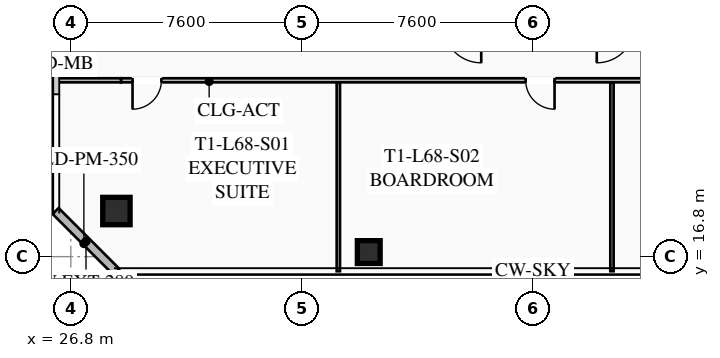
"""IFC4 building model, lengths in metres.
Left out: names, types, materials, properties, quantities, classifications, styles, units other than length and angle.
Written with IfcOpenShell. Run it as: python <this file> out.ifc"""

import sys

from ifc_helpers import new_model, si_unit, direction, frame, frame_2d, origin, origin_2d, place, context, subcontext, project, spatial, rectangle, hollow_rectangle, extrude, element, fill, save


model = new_model("IFC4")
c1 = context("Model", 3, precision=1e-05, world=origin(), true_north=direction((0.0, 1.0)))
c2 = subcontext(c1, "Body", "Model", "MODEL_VIEW")
j1 = project(units=[si_unit("LENGTHUNIT", "METRE"), si_unit("PLANEANGLEUNIT", "RADIAN")], contexts=[c1])
p1 = place(None, origin())
s1 = spatial("IfcSite", under=j1, at=p1, CompositionType="ELEMENT")
p2 = place(p1, origin())
s2 = spatial("IfcBuilding", under=s1, at=p2, CompositionType="ELEMENT")
p3 = place(p2, frame((0.0, 0.0, 251.4)))
s3 = spatial("IfcBuildingStorey", under=s2, at=p3, CompositionType="ELEMENT", Elevation=251.4)
p4 = place(p3, frame((28.3, 18.3, 0.0), z_axis=(0.0, 0.0, 1.0), x_axis=(1.0, 0.0, 0.0)))
e1 = element("IfcColumn", 1, at=p4, inside=s3, PredefinedType="COLUMN", context=c2, shape_type="SweptSolid", body=[
    extrude(hollow_rectangle(XDim=0.9, YDim=0.9, WallThickness=0.04, at=origin_2d()), origin(), (0.0, 0.0, 1.0), 3.78),
])
p5 = place(p3, frame((36.6, 16.95, 0.0), z_axis=(0.0, 0.0, 1.0), x_axis=(1.0, 0.0, 0.0)))
e2 = element("IfcColumn", 2, at=p5, inside=s3, PredefinedType="COLUMN", context=c2, shape_type="SweptSolid", body=[
    extrude(hollow_rectangle(XDim=0.75, YDim=0.75, WallThickness=0.032, at=origin_2d()), origin(), (0.0, 0.0, 1.0), 3.78),
])
p6 = place(p3, frame((28.3, 16.3, 0.0), z_axis=(0.0, 0.0, 1.0), x_axis=(-0.707106781187, 0.707106781187, 0.0)))
e3 = element("IfcWall", 3, at=p6, inside=s3, PredefinedType="SOLIDWALL", context=c2, shape_type="SweptSolid", body=[
    extrude(rectangle(XDim=2.828, YDim=0.28, at=frame_2d((1.414, 0.0))), origin(), (0.0, 0.0, 1.0), 3.78),
])
p7 = place(p3, frame((52.95, 22.6, 0.0), z_axis=(0.0, 0.0, 1.0), x_axis=(-1.0, 0.0, 0.0)))
e4 = element("IfcWall", 4, at=p7, inside=s3, PredefinedType="PARTITIONING", context=c2, shape_type="SweptSolid", body=[
    extrude(rectangle(XDim=24.5, YDim=0.135, at=frame_2d((12.25, 0.0))), origin(), (0.0, 0.0, 1.0), 2.971),
])
p8 = place(p7, frame((23.17, 0.0, 0.0)))
e5 = element("IfcOpeningElement", 5, at=p8, cuts=e4, PredefinedType="OPENING", context=c2, shape_type="SweptSolid", body=[
    extrude(rectangle(XDim=0.95, YDim=2.05, at=frame_2d((0.475, 1.025))), frame((0.0, 0.077, 0.0), z_axis=(0.0, -1.0, 0.0), x_axis=(1.0, 0.0, 0.0)), (0.0, 0.0, 1.0), 0.155),
])
p9 = place(p7, frame((10.238, 0.0, 0.0)))
e6 = element("IfcOpeningElement", 6, at=p9, cuts=e4, PredefinedType="OPENING", context=c2, shape_type="SweptSolid", body=[
    extrude(rectangle(XDim=0.95, YDim=2.05, at=frame_2d((0.475, 1.025))), frame((0.0, 0.077, 0.0), z_axis=(0.0, -1.0, 0.0), x_axis=(1.0, 0.0, 0.0)), (0.0, 0.0, 1.0), 0.155),
])
p10 = place(p7, frame((0.38, 0.0, 0.0)))
e7 = element("IfcOpeningElement", 7, at=p10, cuts=e4, PredefinedType="OPENING", context=c2, shape_type="SweptSolid", body=[
    extrude(rectangle(XDim=0.95, YDim=2.05, at=frame_2d((0.475, 1.025))), frame((0.0, 0.077, 0.0), z_axis=(0.0, -1.0, 0.0), x_axis=(1.0, 0.0, 0.0)), (0.0, 0.0, 1.0), 0.155),
])
p11 = place(p3, frame((26.32, 22.6, 0.0), z_axis=(0.0, 0.0, 1.0), x_axis=(1.0, 0.0, 0.0)))
e8 = element("IfcWall", 8, at=p11, inside=s3, PredefinedType="PARTITIONING", context=c2, shape_type="SweptSolid", body=[
    extrude(rectangle(XDim=2.13, YDim=0.135, at=frame_2d((1.065, 0.0))), origin(), (0.0, 0.0, 1.0), 2.971),
])
for number, where, z_axis, x_axis in (
    (9, (35.6, 16.32, 0.0), (0.0, 0.0, 1.0), (0.0, 1.0, 0.0)),
    (10, (44.6, 16.32, 0.0), (0.0, 0.0, 1.0), (0.0, 1.0, 0.0)),
):
    element("IfcWall", number, at=place(p3, frame(where, z_axis=z_axis, x_axis=x_axis)), inside=s3, PredefinedType="PARTITIONING", context=c2, shape_type="SweptSolid", body=[
        extrude(rectangle(XDim=6.2, YDim=0.11, at=frame_2d((3.1, 0.0))), origin(), (0.0, 0.0, 1.0), 2.971),
    ])
p12 = place(p8, origin())
e11 = element("IfcDoor", 11, at=p12, inside=s3, OperationType="SINGLE_SWING_RIGHT", PredefinedType="DOOR", context=c2, shape_type="SweptSolid", body=[
    extrude(rectangle(XDim=0.95, YDim=2.05, at=frame_2d((0.475, 1.025))), frame((0.0, 0.025, 0.0), z_axis=(0.0, -1.0, 0.0), x_axis=(1.0, 0.0, 0.0)), (0.0, 0.0, 1.0), 0.05),
])
fill(e5, e11)
p13 = place(p9, origin())
e12 = element("IfcDoor", 12, at=p13, inside=s3, OperationType="SINGLE_SWING_LEFT", PredefinedType="DOOR", context=c2, shape_type="SweptSolid", body=[
    extrude(rectangle(XDim=0.95, YDim=2.05, at=frame_2d((0.475, 1.025))), frame((0.0, 0.025, 0.0), z_axis=(0.0, -1.0, 0.0), x_axis=(1.0, 0.0, 0.0)), (0.0, 0.0, 1.0), 0.05),
])
fill(e6, e12)
save(model, sys.argv[1])
